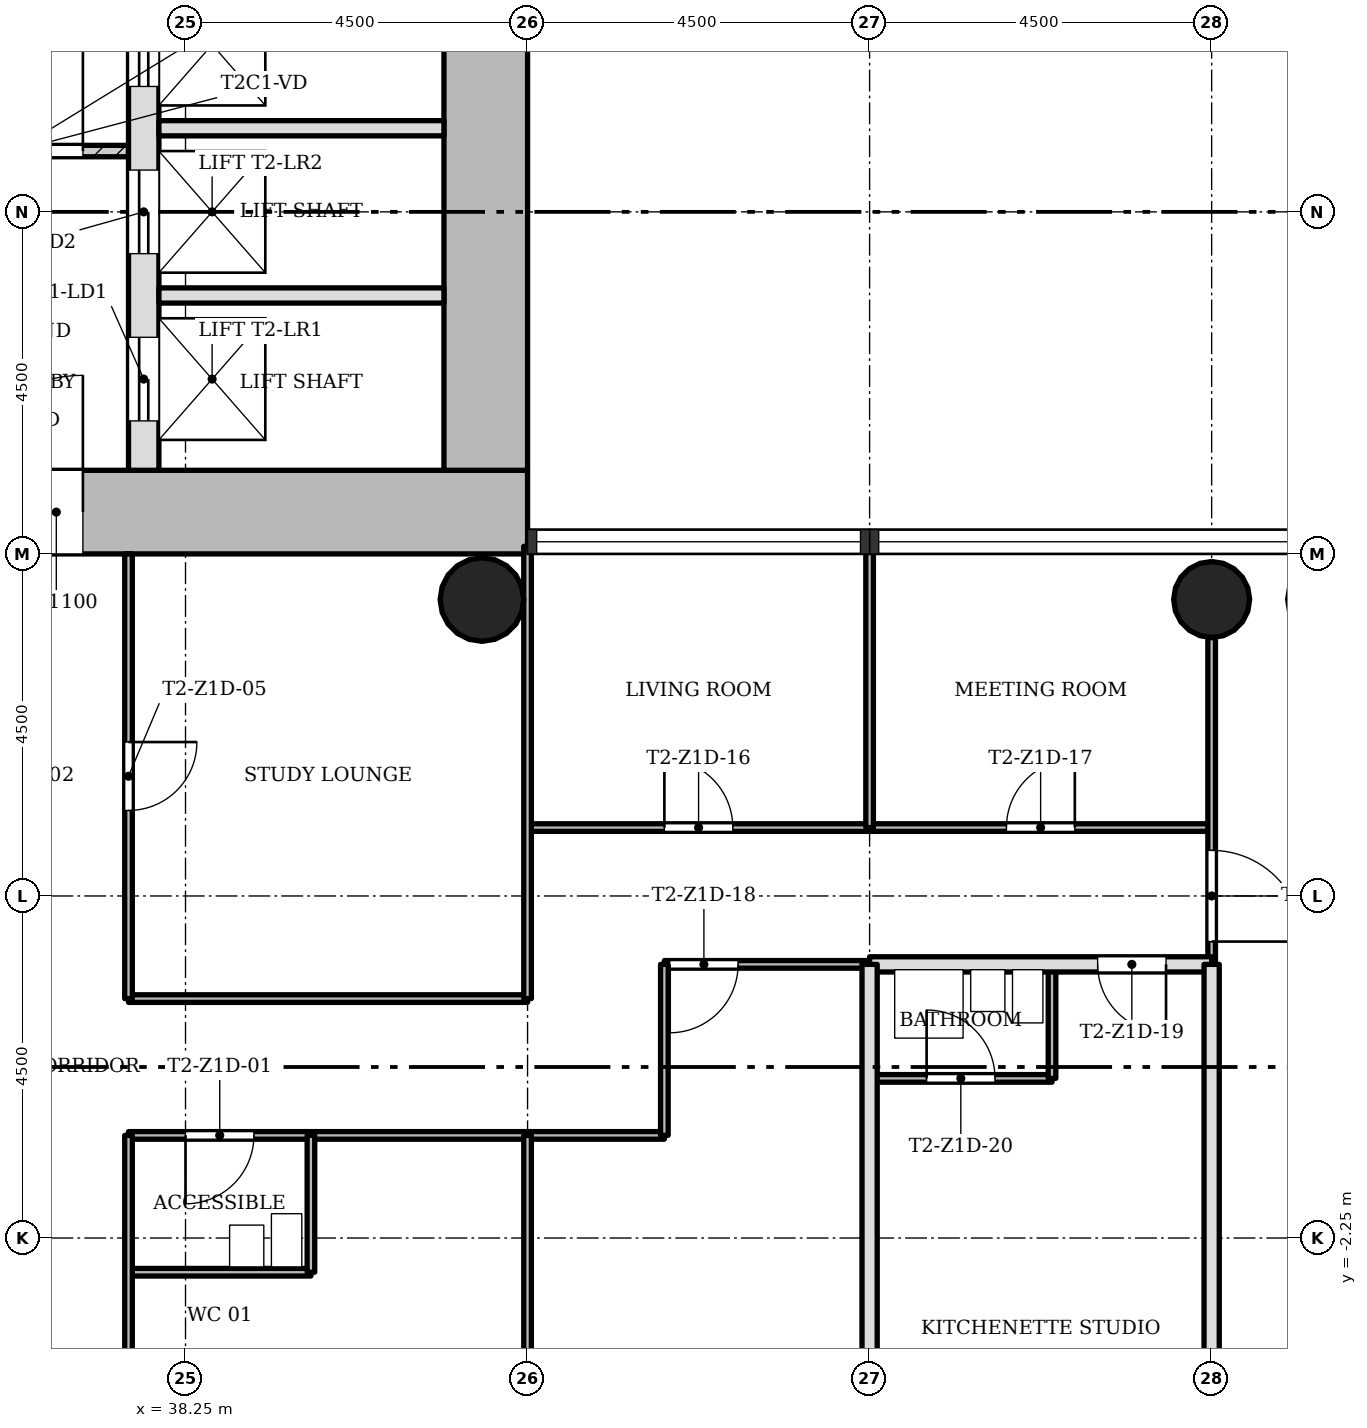
"""IFC4 building model, lengths in metres.
Left out: names, types, materials, properties, quantities, classifications, styles, units other than length and angle.
Written with IfcOpenShell. Run it as: python <this file> out.ifc"""

import sys

from ifc_helpers import new_model, si_unit, direction, frame, frame_2d, origin, origin_2d, place, context, subcontext, project, spatial, rectangle, hollow_circle, extrude, element, fill, save


model = new_model("IFC4")
c1 = context("Model", 3, precision=1e-05, world=origin(), true_north=direction((0.0, 1.0)))
c2 = subcontext(c1, "Body", "Model", "MODEL_VIEW")
j1 = project(units=[si_unit("LENGTHUNIT", "METRE"), si_unit("PLANEANGLEUNIT", "RADIAN")], contexts=[c1])
p1 = place(None, origin())
s1 = spatial("IfcSite", under=j1, at=p1, CompositionType="ELEMENT")
p2 = place(p1, origin())
s2 = spatial("IfcBuilding", under=s1, at=p2, CompositionType="ELEMENT")
p3 = place(p2, frame((0.0, 0.0, 55.1)))
s3 = spatial("IfcBuildingStorey", under=s2, at=p3, CompositionType="ELEMENT", Elevation=55.1)
p4 = place(p3, frame((30.35, 7.3, 0.0), z_axis=(0.0, 0.0, 1.0), x_axis=(1.0, 0.0, 0.0)))
e1 = element("IfcWall", 1, at=p4, inside=s3, PredefinedType="SHEAR", context=c2, shape_type="SweptSolid", body=[
    extrude(rectangle(XDim=12.4, YDim=1.1, at=frame_2d((6.2, 0.0))), origin(), (0.0, 0.0, 1.0), 3.4),
])
p5 = place(p4, frame((4.75, 0.0, 0.0)))
e2 = element("IfcOpeningElement", 2, at=p5, cuts=e1, PredefinedType="OPENING", context=c2, shape_type="SweptSolid", body=[
    extrude(rectangle(XDim=1.8, YDim=2.1, at=frame_2d((0.9, 1.05))), frame((0.0, 0.56, 0.0), z_axis=(0.0, -1.0, 0.0), x_axis=(1.0, 0.0, 0.0)), (0.0, 0.0, 1.0), 1.12),
])
p6 = place(p3, frame((42.2, 7.85, 0.0), z_axis=(0.0, 0.0, 1.0), x_axis=(0.0, 1.0, 0.0)))
e3 = element("IfcWall", 3, at=p6, inside=s3, PredefinedType="SHEAR", context=c2, shape_type="SweptSolid", body=[
    extrude(rectangle(XDim=7.9, YDim=1.1, at=frame_2d((3.95, 0.0))), origin(), (0.0, 0.0, 1.0), 3.4),
])
p7 = place(p3, frame((37.7, 7.85, 0.0), z_axis=(0.0, 0.0, 1.0), x_axis=(0.0, 1.0, 0.0)))
e4 = element("IfcWall", 4, at=p7, inside=s3, PredefinedType="SHEAR", context=c2, shape_type="SweptSolid", body=[
    extrude(rectangle(XDim=6.8, YDim=0.4, at=frame_2d((3.4, 0.0))), origin(), (0.0, 0.0, 1.0), 3.4),
])
p8 = place(p7, frame((0.65, 0.0, 0.0)))
e5 = element("IfcOpeningElement", 5, at=p8, cuts=e4, PredefinedType="OPENING", context=c2, shape_type="SweptSolid", body=[
    extrude(rectangle(XDim=1.1, YDim=2.1, at=frame_2d((0.55, 1.05))), frame((0.0, 0.21, 0.0), z_axis=(0.0, -1.0, 0.0), x_axis=(1.0, 0.0, 0.0)), (0.0, 0.0, 1.0), 0.42),
])
p9 = place(p7, frame((2.85, 0.0, 0.0)))
e6 = element("IfcOpeningElement", 6, at=p9, cuts=e4, PredefinedType="OPENING", context=c2, shape_type="SweptSolid", body=[
    extrude(rectangle(XDim=1.1, YDim=2.1, at=frame_2d((0.55, 1.05))), frame((0.0, 0.21, 0.0), z_axis=(0.0, -1.0, 0.0), x_axis=(1.0, 0.0, 0.0)), (0.0, 0.0, 1.0), 0.42),
])
p10 = place(p7, frame((5.05, 0.0, 0.0)))
e7 = element("IfcOpeningElement", 7, at=p10, cuts=e4, PredefinedType="OPENING", context=c2, shape_type="SweptSolid", body=[
    extrude(rectangle(XDim=1.1, YDim=2.1, at=frame_2d((0.55, 1.05))), frame((0.0, 0.21, 0.0), z_axis=(0.0, -1.0, 0.0), x_axis=(1.0, 0.0, 0.0)), (0.0, 0.0, 1.0), 0.42),
])
p11 = place(p3, frame((51.75, 6.15, 0.0), z_axis=(0.0, 0.0, 1.0), x_axis=(1.0, 0.0, 0.0)))
e8 = element("IfcColumn", 8, at=p11, inside=s3, PredefinedType="COLUMN", context=c2, shape_type="SweptSolid", body=[
    extrude(hollow_circle(Radius=0.5, WallThickness=0.036, at=origin_2d()), origin(), (0.0, 0.0, 1.0), 3.4),
])
p12 = place(p3, frame((42.15, 6.15, 0.0), z_axis=(0.0, 0.0, 1.0), x_axis=(1.0, 0.0, 0.0)))
e9 = element("IfcColumn", 9, at=p12, inside=s3, PredefinedType="COLUMN", context=c2, shape_type="SweptSolid", body=[
    extrude(hollow_circle(Radius=0.55, WallThickness=0.04, at=origin_2d()), origin(), (0.0, 0.0, 1.0), 3.4),
])
p13 = place(p3, frame((37.5, 12.05, 0.0), z_axis=(0.0, 0.0, 1.0), x_axis=(-1.0, 0.0, 0.0)))
e10 = element("IfcWall", 10, at=p13, inside=s3, PredefinedType="PARTITIONING", context=c2, shape_type="SweptSolid", body=[
    extrude(rectangle(XDim=3.0, YDim=0.15, at=frame_2d((1.5, 0.0))), origin(), (0.0, 0.0, 1.0), 3.0),
])
p14 = place(p13, frame((0.6, 0.0, 0.0)))
e11 = element("IfcOpeningElement", 11, at=p14, cuts=e10, PredefinedType="OPENING", context=c2, shape_type="SweptSolid", body=[
    extrude(rectangle(XDim=1.8, YDim=2.1, at=frame_2d((0.9, 1.05))), frame((0.0, 0.085, 0.0), z_axis=(0.0, -1.0, 0.0), x_axis=(1.0, 0.0, 0.0)), (0.0, 0.0, 1.0), 0.17),
])
for number, where, z_axis, x_axis in (
    (12, (41.65, 10.15, 0.0), (0.0, 0.0, 1.0), (-1.0, 0.0, 0.0)),
    (13, (41.65, 12.35, 0.0), (0.0, 0.0, 1.0), (-1.0, 0.0, 0.0)),
):
    element("IfcWall", number, at=place(p3, frame(where, z_axis=z_axis, x_axis=x_axis)), inside=s3, PredefinedType="SOLIDWALL", context=c2, shape_type="SweptSolid", body=[
        extrude(rectangle(XDim=3.75, YDim=0.2, at=frame_2d((1.875, 0.0))), origin(), (0.0, 0.0, 1.0), 3.0),
    ])
p15 = place(p3, frame((39.9, -2.7, 0.0), z_axis=(0.0, 0.0, 1.0), x_axis=(-1.0, 0.0, 0.0)))
e14 = element("IfcWall", 14, at=p15, inside=s3, PredefinedType="PARTITIONING", context=c2, shape_type="SweptSolid", body=[
    extrude(rectangle(XDim=2.4, YDim=0.1, at=frame_2d((1.2, 0.0))), origin(), (0.0, 0.0, 1.0), 3.0),
])
p16 = place(p3, frame((44.55, -0.9, 0.0), z_axis=(0.0, 0.0, 1.0), x_axis=(-1.0, 0.0, 0.0)))
e15 = element("IfcWall", 15, at=p16, inside=s3, PredefinedType="PARTITIONING", context=c2, shape_type="SweptSolid", body=[
    extrude(rectangle(XDim=7.05, YDim=0.1, at=frame_2d((3.525, 0.0))), origin(), (0.0, 0.0, 1.0), 3.0),
])
p17 = place(p16, frame((5.4, 0.0, 0.0)))
e16 = element("IfcOpeningElement", 16, at=p17, cuts=e15, PredefinedType="OPENING", context=c2, shape_type="SweptSolid", body=[
    extrude(rectangle(XDim=0.9, YDim=2.1, at=frame_2d((0.45, 1.05))), frame((0.0, 0.06, 0.0), z_axis=(0.0, -1.0, 0.0), x_axis=(1.0, 0.0, 0.0)), (0.0, 0.0, 1.0), 0.12),
])
p18 = place(p3, frame((49.65, -0.15, 0.0), z_axis=(0.0, 0.0, 1.0), x_axis=(-1.0, 0.0, 0.0)))
e17 = element("IfcWall", 17, at=p18, inside=s3, PredefinedType="PARTITIONING", context=c2, shape_type="SweptSolid", body=[
    extrude(rectangle(XDim=2.4, YDim=0.1, at=frame_2d((1.2, 0.0))), origin(), (0.0, 0.0, 1.0), 3.0),
])
p19 = place(p18, frame((0.75, 0.0, 0.0)))
e18 = element("IfcOpeningElement", 18, at=p19, cuts=e17, PredefinedType="OPENING", context=c2, shape_type="SweptSolid", body=[
    extrude(rectangle(XDim=0.9, YDim=2.1, at=frame_2d((0.45, 1.05))), frame((0.0, 0.06, 0.0), z_axis=(0.0, -1.0, 0.0), x_axis=(1.0, 0.0, 0.0)), (0.0, 0.0, 1.0), 0.12),
])
p20 = place(p3, frame((42.75, 0.9, 0.0), z_axis=(0.0, 0.0, 1.0), x_axis=(-1.0, 0.0, 0.0)))
e19 = element("IfcWall", 19, at=p20, inside=s3, PredefinedType="PARTITIONING", context=c2, shape_type="SweptSolid", body=[
    extrude(rectangle(XDim=5.25, YDim=0.1, at=frame_2d((2.625, 0.0))), origin(), (0.0, 0.0, 1.0), 3.0),
])
p21 = place(p3, frame((47.25, 1.35, 0.0), z_axis=(0.0, 0.0, 1.0), x_axis=(-1.0, 0.0, 0.0)))
e20 = element("IfcWall", 20, at=p21, inside=s3, PredefinedType="PARTITIONING", context=c2, shape_type="SweptSolid", body=[
    extrude(rectangle(XDim=2.7, YDim=0.1, at=frame_2d((1.35, 0.0))), origin(), (0.0, 0.0, 1.0), 3.0),
])
p22 = place(p21, frame((1.73, 0.0, 0.0)))
e21 = element("IfcOpeningElement", 21, at=p22, cuts=e20, PredefinedType="OPENING", context=c2, shape_type="SweptSolid", body=[
    extrude(rectangle(XDim=0.9, YDim=2.1, at=frame_2d((0.45, 1.05))), frame((0.0, 0.06, 0.0), z_axis=(0.0, -1.0, 0.0), x_axis=(1.0, 0.0, 0.0)), (0.0, 0.0, 1.0), 0.12),
])
p23 = place(p3, frame((51.75, 1.35, 0.0), z_axis=(0.0, 0.0, 1.0), x_axis=(-1.0, 0.0, 0.0)))
e22 = element("IfcWall", 22, at=p23, inside=s3, PredefinedType="SOLIDWALL", context=c2, shape_type="SweptSolid", body=[
    extrude(rectangle(XDim=4.5, YDim=0.2, at=frame_2d((2.25, 0.0))), origin(), (0.0, 0.0, 1.0), 3.0),
])
p24 = place(p23, frame((0.6, 0.0, 0.0)))
e23 = element("IfcOpeningElement", 23, at=p24, cuts=e22, PredefinedType="OPENING", context=c2, shape_type="SweptSolid", body=[
    extrude(rectangle(XDim=0.9, YDim=2.1, at=frame_2d((0.45, 1.05))), frame((0.0, 0.11, 0.0), z_axis=(0.0, -1.0, 0.0), x_axis=(1.0, 0.0, 0.0)), (0.0, 0.0, 1.0), 0.22),
])
p25 = place(p3, frame((51.75, 3.15, 0.0), z_axis=(0.0, 0.0, 1.0), x_axis=(-1.0, 0.0, 0.0)))
e24 = element("IfcWall", 24, at=p25, inside=s3, PredefinedType="PARTITIONING", context=c2, shape_type="SweptSolid", body=[
    extrude(rectangle(XDim=9.0, YDim=0.1, at=frame_2d((4.5, 0.0))), origin(), (0.0, 0.0, 1.0), 3.0),
])
p26 = place(p25, frame((6.3, 0.0, 0.0)))
e25 = element("IfcOpeningElement", 25, at=p26, cuts=e24, PredefinedType="OPENING", context=c2, shape_type="SweptSolid", body=[
    extrude(rectangle(XDim=0.9, YDim=2.1, at=frame_2d((0.45, 1.05))), frame((0.0, 0.06, 0.0), z_axis=(0.0, -1.0, 0.0), x_axis=(1.0, 0.0, 0.0)), (0.0, 0.0, 1.0), 0.12),
])
p27 = place(p25, frame((1.8, 0.0, 0.0)))
e26 = element("IfcOpeningElement", 26, at=p27, cuts=e24, PredefinedType="OPENING", context=c2, shape_type="SweptSolid", body=[
    extrude(rectangle(XDim=0.9, YDim=2.1, at=frame_2d((0.45, 1.05))), frame((0.0, 0.06, 0.0), z_axis=(0.0, -1.0, 0.0), x_axis=(1.0, 0.0, 0.0)), (0.0, 0.0, 1.0), 0.12),
])
p28 = place(p3, frame((51.75, 1.35, 0.0), z_axis=(0.0, 0.0, 1.0), x_axis=(0.0, 1.0, 0.0)))
e27 = element("IfcWall", 27, at=p28, inside=s3, PredefinedType="PARTITIONING", context=c2, shape_type="SweptSolid", body=[
    extrude(rectangle(XDim=4.3, YDim=0.1, at=frame_2d((2.15, 0.0))), origin(), (0.0, 0.0, 1.0), 3.0),
])
p29 = place(p28, frame((0.3, 0.0, 0.0)))
e28 = element("IfcOpeningElement", 28, at=p29, cuts=e27, PredefinedType="OPENING", context=c2, shape_type="SweptSolid", body=[
    extrude(rectangle(XDim=1.2, YDim=2.1, at=frame_2d((0.6, 1.05))), frame((0.0, 0.06, 0.0), z_axis=(0.0, -1.0, 0.0), x_axis=(1.0, 0.0, 0.0)), (0.0, 0.0, 1.0), 0.12),
])
p30 = place(p3, frame((51.75, -5.65, 0.0), z_axis=(0.0, 0.0, 1.0), x_axis=(0.0, 1.0, 0.0)))
e29 = element("IfcWall", 29, at=p30, inside=s3, PredefinedType="SOLIDWALL", context=c2, shape_type="SweptSolid", body=[
    extrude(rectangle(XDim=7.0, YDim=0.2, at=frame_2d((3.5, 0.0))), origin(), (0.0, 0.0, 1.0), 3.0),
])
p31 = place(p3, frame((49.65, -0.15, 0.0), z_axis=(0.0, 0.0, 1.0), x_axis=(0.0, 1.0, 0.0)))
e30 = element("IfcWall", 30, at=p31, inside=s3, PredefinedType="PARTITIONING", context=c2, shape_type="SweptSolid", body=[
    extrude(rectangle(XDim=1.5, YDim=0.1, at=frame_2d((0.75, 0.0))), origin(), (0.0, 0.0, 1.0), 3.0),
])
p32 = place(p3, frame((47.25, 3.15, 0.0), z_axis=(0.0, 0.0, 1.0), x_axis=(0.0, 1.0, 0.0)))
e31 = element("IfcWall", 31, at=p32, inside=s3, PredefinedType="PARTITIONING", context=c2, shape_type="SweptSolid", body=[
    extrude(rectangle(XDim=3.7, YDim=0.1, at=frame_2d((1.85, 0.0))), origin(), (0.0, 0.0, 1.0), 3.0),
])
p33 = place(p3, frame((47.25, -6.85, 0.0), z_axis=(0.0, 0.0, 1.0), x_axis=(0.0, 1.0, 0.0)))
e32 = element("IfcWall", 32, at=p33, inside=s3, PredefinedType="SOLIDWALL", context=c2, shape_type="SweptSolid", body=[
    extrude(rectangle(XDim=8.2, YDim=0.2, at=frame_2d((4.1, 0.0))), origin(), (0.0, 0.0, 1.0), 3.0),
])
p34 = place(p3, frame((44.55, -0.9, 0.0), z_axis=(0.0, 0.0, 1.0), x_axis=(0.0, 1.0, 0.0)))
e33 = element("IfcWall", 33, at=p34, inside=s3, PredefinedType="PARTITIONING", context=c2, shape_type="SweptSolid", body=[
    extrude(rectangle(XDim=2.25, YDim=0.1, at=frame_2d((1.125, 0.0))), origin(), (0.0, 0.0, 1.0), 3.0),
])
for number, where, z_axis, x_axis in (
    (34, (42.75, -6.85, 0.0), (0.0, 0.0, 1.0), (0.0, 1.0, 0.0)),
    (35, (42.75, 0.9, 0.0), (0.0, 0.0, 1.0), (0.0, 1.0, 0.0)),
):
    element("IfcWall", number, at=place(p3, frame(where, z_axis=z_axis, x_axis=x_axis)), inside=s3, PredefinedType="PARTITIONING", context=c2, shape_type="SweptSolid", body=[
        extrude(rectangle(XDim=5.95, YDim=0.1, at=frame_2d((2.975, 0.0))), origin(), (0.0, 0.0, 1.0), 3.0),
    ])
p35 = place(p3, frame((39.9, -2.7, 0.0), z_axis=(0.0, 0.0, 1.0), x_axis=(0.0, 1.0, 0.0)))
e36 = element("IfcWall", 36, at=p35, inside=s3, PredefinedType="PARTITIONING", context=c2, shape_type="SweptSolid", body=[
    extrude(rectangle(XDim=1.8, YDim=0.1, at=frame_2d((0.9, 0.0))), origin(), (0.0, 0.0, 1.0), 3.0),
])
p36 = place(p3, frame((37.5, -6.75, 0.0), z_axis=(0.0, 0.0, 1.0), x_axis=(0.0, 1.0, 0.0)))
e37 = element("IfcWall", 37, at=p36, inside=s3, PredefinedType="PARTITIONING", context=c2, shape_type="SweptSolid", body=[
    extrude(rectangle(XDim=5.85, YDim=0.1, at=frame_2d((2.925, 0.0))), origin(), (0.0, 0.0, 1.0), 3.0),
])
p37 = place(p36, frame((1.575, 0.0, 0.0)))
e38 = element("IfcOpeningElement", 38, at=p37, cuts=e37, PredefinedType="OPENING", context=c2, shape_type="SweptSolid", body=[
    extrude(rectangle(XDim=0.9, YDim=2.1, at=frame_2d((0.45, 1.05))), frame((0.0, 0.06, 0.0), z_axis=(0.0, -1.0, 0.0), x_axis=(1.0, 0.0, 0.0)), (0.0, 0.0, 1.0), 0.12),
])
p38 = place(p3, frame((37.5, 0.9, 0.0), z_axis=(0.0, 0.0, 1.0), x_axis=(0.0, 1.0, 0.0)))
e39 = element("IfcWall", 39, at=p38, inside=s3, PredefinedType="PARTITIONING", context=c2, shape_type="SweptSolid", body=[
    extrude(rectangle(XDim=5.85, YDim=0.1, at=frame_2d((2.925, 0.0))), origin(), (0.0, 0.0, 1.0), 3.0),
])
p39 = place(p38, frame((2.475, 0.0, 0.0)))
e40 = element("IfcOpeningElement", 40, at=p39, cuts=e39, PredefinedType="OPENING", context=c2, shape_type="SweptSolid", body=[
    extrude(rectangle(XDim=0.9, YDim=2.1, at=frame_2d((0.45, 1.05))), frame((0.0, 0.06, 0.0), z_axis=(0.0, -1.0, 0.0), x_axis=(1.0, 0.0, 0.0)), (0.0, 0.0, 1.0), 0.12),
])
p40 = place(p14, origin())
e41 = element("IfcDoor", 41, at=p40, inside=s3, OperationType="SINGLE_SWING_LEFT", PredefinedType="DOOR", context=c2, shape_type="SweptSolid", body=[
    extrude(rectangle(XDim=1.8, YDim=2.1, at=frame_2d((0.9, 1.05))), frame((0.0, 0.025, 0.0), z_axis=(0.0, -1.0, 0.0), x_axis=(1.0, 0.0, 0.0)), (0.0, 0.0, 1.0), 0.05),
])
fill(e11, e41)
p41 = place(p17, origin())
e42 = element("IfcDoor", 42, at=p41, inside=s3, OperationType="SINGLE_SWING_LEFT", PredefinedType="DOOR", context=c2, shape_type="SweptSolid", body=[
    extrude(rectangle(XDim=0.9, YDim=2.1, at=frame_2d((0.45, 1.05))), frame((0.0, 0.025, 0.0), z_axis=(0.0, -1.0, 0.0), x_axis=(1.0, 0.0, 0.0)), (0.0, 0.0, 1.0), 0.05),
])
fill(e16, e42)
p42 = place(p39, origin())
e43 = element("IfcDoor", 43, at=p42, inside=s3, OperationType="SINGLE_SWING_RIGHT", PredefinedType="DOOR", context=c2, shape_type="SweptSolid", body=[
    extrude(rectangle(XDim=0.9, YDim=2.1, at=frame_2d((0.45, 1.05))), frame((0.0, 0.025, 0.0), z_axis=(0.0, -1.0, 0.0), x_axis=(1.0, 0.0, 0.0)), (0.0, 0.0, 1.0), 0.05),
])
fill(e40, e43)
p43 = place(p26, origin())
e44 = element("IfcDoor", 44, at=p43, inside=s3, OperationType="SINGLE_SWING_RIGHT", PredefinedType="DOOR", context=c2, shape_type="SweptSolid", body=[
    extrude(rectangle(XDim=0.9, YDim=2.1, at=frame_2d((0.45, 1.05))), frame((0.0, 0.025, 0.0), z_axis=(0.0, -1.0, 0.0), x_axis=(1.0, 0.0, 0.0)), (0.0, 0.0, 1.0), 0.05),
])
fill(e25, e44)
p44 = place(p27, origin())
e45 = element("IfcDoor", 45, at=p44, inside=s3, OperationType="SINGLE_SWING_LEFT", PredefinedType="DOOR", context=c2, shape_type="SweptSolid", body=[
    extrude(rectangle(XDim=0.9, YDim=2.1, at=frame_2d((0.45, 1.05))), frame((0.0, 0.025, 0.0), z_axis=(0.0, -1.0, 0.0), x_axis=(1.0, 0.0, 0.0)), (0.0, 0.0, 1.0), 0.05),
])
fill(e26, e45)
p45 = place(p22, origin())
e46 = element("IfcDoor", 46, at=p45, inside=s3, OperationType="SINGLE_SWING_LEFT", PredefinedType="DOOR", context=c2, shape_type="SweptSolid", body=[
    extrude(rectangle(XDim=0.9, YDim=2.1, at=frame_2d((0.45, 1.05))), frame((0.0, 0.025, 0.0), z_axis=(0.0, -1.0, 0.0), x_axis=(1.0, 0.0, 0.0)), (0.0, 0.0, 1.0), 0.05),
])
fill(e21, e46)
p46 = place(p24, origin())
e47 = element("IfcDoor", 47, at=p46, inside=s3, OperationType="SINGLE_SWING_RIGHT", PredefinedType="DOOR", context=c2, shape_type="SweptSolid", body=[
    extrude(rectangle(XDim=0.9, YDim=2.1, at=frame_2d((0.45, 1.05))), frame((0.0, 0.025, 0.0), z_axis=(0.0, -1.0, 0.0), x_axis=(1.0, 0.0, 0.0)), (0.0, 0.0, 1.0), 0.05),
])
fill(e23, e47)
p47 = place(p19, origin())
e48 = element("IfcDoor", 48, at=p47, inside=s3, OperationType="SINGLE_SWING_RIGHT", PredefinedType="DOOR", context=c2, shape_type="SweptSolid", body=[
    extrude(rectangle(XDim=0.9, YDim=2.1, at=frame_2d((0.45, 1.05))), frame((0.0, 0.025, 0.0), z_axis=(0.0, -1.0, 0.0), x_axis=(1.0, 0.0, 0.0)), (0.0, 0.0, 1.0), 0.05),
])
fill(e18, e48)
p48 = place(p29, origin())
e49 = element("IfcDoor", 49, at=p48, inside=s3, OperationType="SINGLE_SWING_LEFT", PredefinedType="DOOR", context=c2, shape_type="SweptSolid", body=[
    extrude(rectangle(XDim=1.2, YDim=2.1, at=frame_2d((0.6, 1.05))), frame((0.0, 0.025, 0.0), z_axis=(0.0, -1.0, 0.0), x_axis=(1.0, 0.0, 0.0)), (0.0, 0.0, 1.0), 0.05),
])
fill(e28, e49)
p49 = place(p8, origin())
e50 = element("IfcDoor", 50, at=p49, inside=s3, OperationType="SLIDING_TO_LEFT", PredefinedType="DOOR", context=c2, shape_type="SweptSolid", body=[
    extrude(rectangle(XDim=1.1, YDim=2.1, at=frame_2d((0.55, 1.05))), frame((0.0, 0.025, 0.0), z_axis=(0.0, -1.0, 0.0), x_axis=(1.0, 0.0, 0.0)), (0.0, 0.0, 1.0), 0.05),
])
fill(e5, e50)
p50 = place(p9, origin())
e51 = element("IfcDoor", 51, at=p50, inside=s3, OperationType="SLIDING_TO_LEFT", PredefinedType="DOOR", context=c2, shape_type="SweptSolid", body=[
    extrude(rectangle(XDim=1.1, YDim=2.1, at=frame_2d((0.55, 1.05))), frame((0.0, 0.025, 0.0), z_axis=(0.0, -1.0, 0.0), x_axis=(1.0, 0.0, 0.0)), (0.0, 0.0, 1.0), 0.05),
])
fill(e6, e51)
p51 = place(p10, origin())
e52 = element("IfcDoor", 52, at=p51, inside=s3, OperationType="SLIDING_TO_LEFT", PredefinedType="DOOR", context=c2, shape_type="SweptSolid", body=[
    extrude(rectangle(XDim=1.1, YDim=2.1, at=frame_2d((0.55, 1.05))), frame((0.0, 0.025, 0.0), z_axis=(0.0, -1.0, 0.0), x_axis=(1.0, 0.0, 0.0)), (0.0, 0.0, 1.0), 0.05),
])
fill(e7, e52)
p52 = place(p5, origin())
e53 = element("IfcDoor", 53, at=p52, inside=s3, OperationType="SINGLE_SWING_LEFT", PredefinedType="DOOR", context=c2, shape_type="SweptSolid", body=[
    extrude(rectangle(XDim=1.8, YDim=2.1, at=frame_2d((0.9, 1.05))), frame((0.0, 0.025, 0.0), z_axis=(0.0, -1.0, 0.0), x_axis=(1.0, 0.0, 0.0)), (0.0, 0.0, 1.0), 0.05),
])
fill(e2, e53)
save(model, sys.argv[1])
